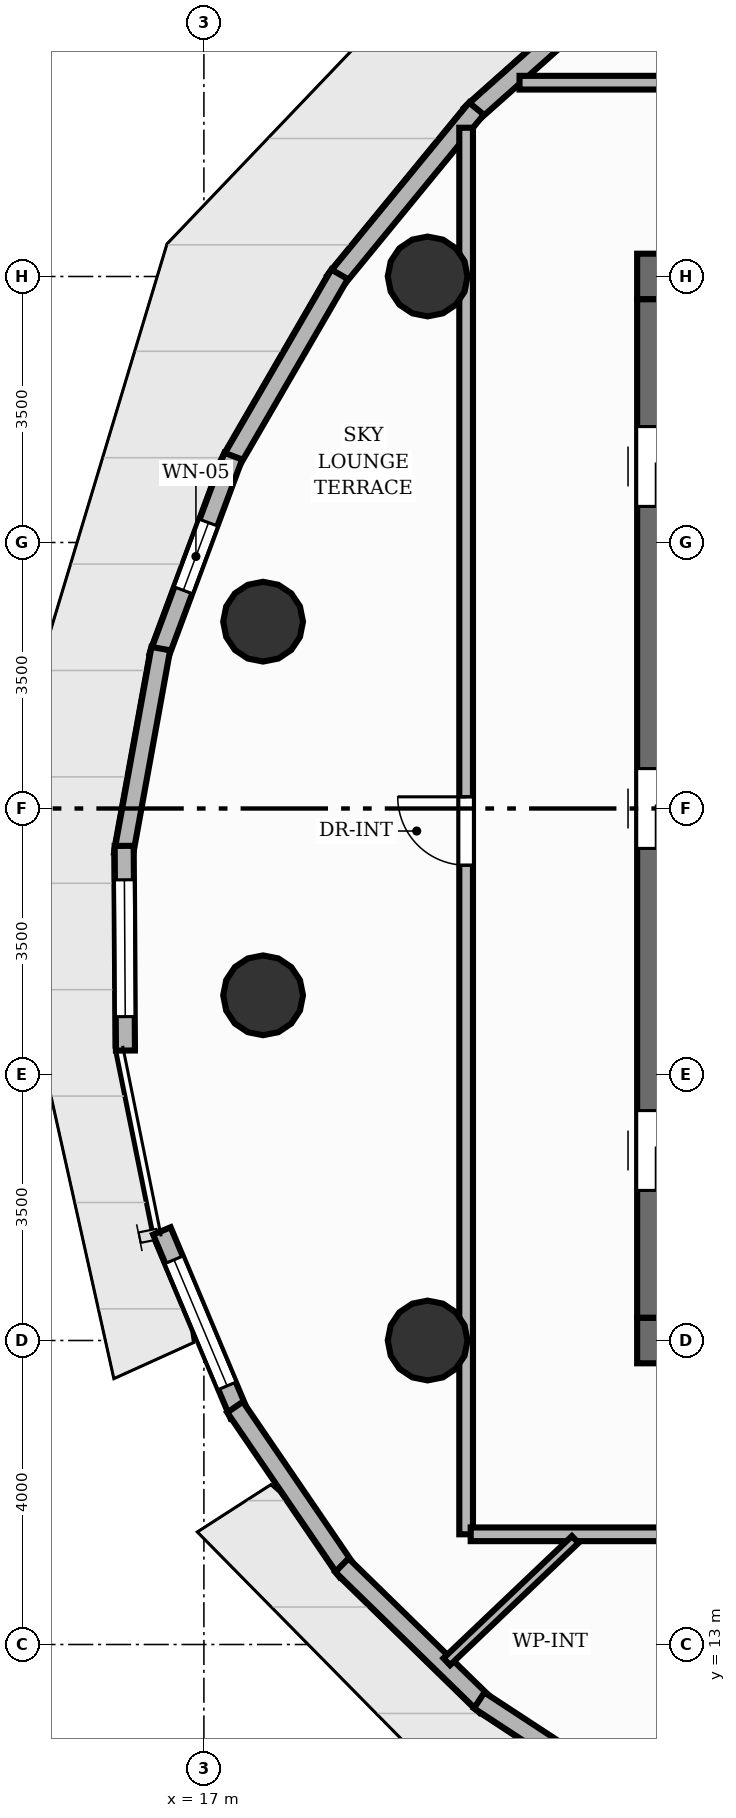
"""IFC4 building model, lengths in metres.
Left out: names, types, materials, properties, quantities, classifications, styles, units other than length and angle.
Written with IfcOpenShell. Run it as: python <this file> out.ifc"""

import sys

from ifc_helpers import new_model, si_unit, direction, frame, frame_2d, origin, origin_2d, place, context, subcontext, project, spatial, rectangle, circle, extrude, element, fill, save


model = new_model("IFC4")
c1 = context("Model", 3, precision=1e-05, world=origin(), true_north=direction((0.0, 1.0)))
c2 = subcontext(c1, "Body", "Model", "MODEL_VIEW")
j1 = project(units=[si_unit("LENGTHUNIT", "METRE"), si_unit("PLANEANGLEUNIT", "RADIAN")], contexts=[c1])
p1 = place(None, origin())
s1 = spatial("IfcSite", under=j1, at=p1, CompositionType="ELEMENT")
p2 = place(p1, origin())
s2 = spatial("IfcBuilding", under=s1, at=p2, CompositionType="ELEMENT")
p3 = place(p2, frame((0.0, 0.0, 116.96)))
s3 = spatial("IfcBuildingStorey", under=s2, at=p3, CompositionType="ELEMENT", Elevation=116.96)
p4 = place(p3, frame((22.7, 17.0, 0.0), z_axis=(0.0, 0.0, 1.0), x_axis=(1.0, 0.0, 0.0)))
e1 = element("IfcWall", 1, at=p4, inside=s3, PredefinedType="SHEAR", context=c2, shape_type="SweptSolid", body=[
    extrude(rectangle(XDim=18.6, YDim=0.6, at=frame_2d((9.3, 0.0))), origin(), (0.0, 0.0, 1.0), 3.2),
])
p5 = place(p4, frame((5.8, 0.0, 0.0)))
e2 = element("IfcOpeningElement", 2, at=p5, cuts=e1, PredefinedType="OPENING", context=c2, shape_type="SweptSolid", body=[
    extrude(rectangle(XDim=1.1, YDim=2.15, at=frame_2d((0.55, 1.075))), frame((0.0, 0.31, 0.0), z_axis=(0.0, -1.0, 0.0), x_axis=(1.0, 0.0, 0.0)), (0.0, 0.0, 1.0), 0.62),
])
p6 = place(p4, frame((9.35, 0.0, 0.0)))
e3 = element("IfcOpeningElement", 3, at=p6, cuts=e1, PredefinedType="OPENING", context=c2, shape_type="SweptSolid", body=[
    extrude(rectangle(XDim=0.9, YDim=2.1, at=frame_2d((0.45, 1.05))), frame((0.0, 0.31, 0.0), z_axis=(0.0, -1.0, 0.0), x_axis=(1.0, 0.0, 0.0)), (0.0, 0.0, 1.0), 0.62),
])
p7 = place(p3, frame((22.7, 31.0, 0.0), z_axis=(0.0, 0.0, 1.0), x_axis=(1.0, 0.0, 0.0)))
e4 = element("IfcWall", 4, at=p7, inside=s3, PredefinedType="SHEAR", context=c2, shape_type="SweptSolid", body=[
    extrude(rectangle(XDim=18.6, YDim=0.6, at=frame_2d((9.3, 0.0))), origin(), (0.0, 0.0, 1.0), 3.2),
])
p8 = place(p7, frame((11.7, 0.0, 0.0)))
e5 = element("IfcOpeningElement", 5, at=p8, cuts=e4, PredefinedType="OPENING", context=c2, shape_type="SweptSolid", body=[
    extrude(rectangle(XDim=1.1, YDim=2.15, at=frame_2d((0.55, 1.075))), frame((0.0, 0.31, 0.0), z_axis=(0.0, -1.0, 0.0), x_axis=(1.0, 0.0, 0.0)), (0.0, 0.0, 1.0), 0.62),
])
p9 = place(p7, frame((4.325, 0.0, 0.0)))
e6 = element("IfcOpeningElement", 6, at=p9, cuts=e4, PredefinedType="OPENING", context=c2, shape_type="SweptSolid", body=[
    extrude(rectangle(XDim=1.05, YDim=2.15, at=frame_2d((0.525, 1.075))), frame((0.0, 0.31, 0.0), z_axis=(0.0, -1.0, 0.0), x_axis=(1.0, 0.0, 0.0)), (0.0, 0.0, 1.0), 0.62),
])
p10 = place(p7, frame((6.075, 0.0, 0.0)))
e7 = element("IfcOpeningElement", 7, at=p10, cuts=e4, PredefinedType="OPENING", context=c2, shape_type="SweptSolid", body=[
    extrude(rectangle(XDim=1.05, YDim=2.15, at=frame_2d((0.525, 1.075))), frame((0.0, 0.31, 0.0), z_axis=(0.0, -1.0, 0.0), x_axis=(1.0, 0.0, 0.0)), (0.0, 0.0, 1.0), 0.62),
])
p11 = place(p7, frame((7.825, 0.0, 0.0)))
e8 = element("IfcOpeningElement", 8, at=p11, cuts=e4, PredefinedType="OPENING", context=c2, shape_type="SweptSolid", body=[
    extrude(rectangle(XDim=1.05, YDim=2.15, at=frame_2d((0.525, 1.075))), frame((0.0, 0.31, 0.0), z_axis=(0.0, -1.0, 0.0), x_axis=(1.0, 0.0, 0.0)), (0.0, 0.0, 1.0), 0.62),
])
p12 = place(p3, frame((23.0, 17.3, 0.0), z_axis=(0.0, 0.0, 1.0), x_axis=(0.0, 1.0, 0.0)))
e9 = element("IfcWall", 9, at=p12, inside=s3, PredefinedType="SHEAR", context=c2, shape_type="SweptSolid", body=[
    extrude(rectangle(XDim=13.4, YDim=0.6, at=frame_2d((6.7, 0.0))), origin(), (0.0, 0.0, 1.0), 3.2),
])
p13 = place(p12, frame((1.675, 0.0, 0.0)))
e10 = element("IfcOpeningElement", 10, at=p13, cuts=e9, PredefinedType="OPENING", context=c2, shape_type="SweptSolid", body=[
    extrude(rectangle(XDim=1.05, YDim=2.15, at=frame_2d((0.525, 1.075))), frame((0.0, 0.31, 0.0), z_axis=(0.0, -1.0, 0.0), x_axis=(1.0, 0.0, 0.0)), (0.0, 0.0, 1.0), 0.62),
])
p14 = place(p12, frame((6.175, 0.0, 0.0)))
e11 = element("IfcOpeningElement", 11, at=p14, cuts=e9, PredefinedType="OPENING", context=c2, shape_type="SweptSolid", body=[
    extrude(rectangle(XDim=1.05, YDim=2.15, at=frame_2d((0.525, 1.075))), frame((0.0, 0.31, 0.0), z_axis=(0.0, -1.0, 0.0), x_axis=(1.0, 0.0, 0.0)), (0.0, 0.0, 1.0), 0.62),
])
p15 = place(p12, frame((10.675, 0.0, 0.0)))
e12 = element("IfcOpeningElement", 12, at=p15, cuts=e9, PredefinedType="OPENING", context=c2, shape_type="SweptSolid", body=[
    extrude(rectangle(XDim=1.05, YDim=2.15, at=frame_2d((0.525, 1.075))), frame((0.0, 0.31, 0.0), z_axis=(0.0, -1.0, 0.0), x_axis=(1.0, 0.0, 0.0)), (0.0, 0.0, 1.0), 0.62),
])
for number, where, z_axis, x_axis in (
    (13, (19.944, 31.0, 0.0), (0.0, 0.0, 1.0), (1.0, 0.0, 0.0)),
    (14, (17.779, 26.458, 0.0), (0.0, 0.0, 1.0), (1.0, 0.0, 0.0)),
    (15, (17.779, 21.542, 0.0), (0.0, 0.0, 1.0), (1.0, 0.0, 0.0)),
    (16, (19.944, 17.0, 0.0), (0.0, 0.0, 1.0), (1.0, 0.0, 0.0)),
):
    element("IfcColumn", number, at=place(p3, frame(where, z_axis=z_axis, x_axis=x_axis)), inside=s3, PredefinedType="COLUMN", context=c2, shape_type="SweptSolid", body=[
        extrude(circle(Radius=0.525, at=origin_2d()), origin(), (0.0, 0.0, 1.0), 3.2),
    ])
p16 = place(p3, frame((20.51, 33.13, 0.0), z_axis=(0.0, 0.0, 1.0), x_axis=(0.746920467444, 0.664913389332, 0.0)))
e17 = element("IfcWall", 17, at=p16, inside=s3, PredefinedType="SOLIDWALL", context=c2, shape_type="SweptSolid", body=[
    extrude(rectangle(XDim=2.977, YDim=0.25, at=frame_2d((1.489, 0.0))), origin(), (0.0, 0.0, 1.0), 2.96),
])
p17 = place(p3, frame((18.722, 30.938, 0.0), z_axis=(0.0, 0.0, 1.0), x_axis=(0.634328076021, 0.7730639637, 0.0)))
e18 = element("IfcWall", 18, at=p17, inside=s3, PredefinedType="SOLIDWALL", context=c2, shape_type="SweptSolid", body=[
    extrude(rectangle(XDim=2.937, YDim=0.25, at=frame_2d((1.469, 0.0))), origin(), (0.0, 0.0, 1.0), 2.96),
])
p18 = place(p3, frame((17.34, 28.536, 0.0), z_axis=(0.0, 0.0, 1.0), x_axis=(0.501630602612, 0.865081925903, 0.0)))
e19 = element("IfcWall", 19, at=p18, inside=s3, PredefinedType="SOLIDWALL", context=c2, shape_type="SweptSolid", body=[
    extrude(rectangle(XDim=2.882, YDim=0.25, at=frame_2d((1.441, 0.0))), origin(), (0.0, 0.0, 1.0), 2.96),
])
p19 = place(p3, frame((16.403, 25.996, 0.0), z_axis=(0.0, 0.0, 1.0), x_axis=(0.349100071797, 0.93708544961, 0.0)))
e20 = element("IfcWall", 20, at=p19, inside=s3, PredefinedType="SOLIDWALL", context=c2, shape_type="SweptSolid", body=[
    extrude(rectangle(XDim=2.818, YDim=0.25, at=frame_2d((1.409, 0.0))), origin(), (0.0, 0.0, 1.0), 2.96),
])
p20 = place(p19, frame((0.934, 0.0, 0.85)))
e21 = element("IfcOpeningElement", 21, at=p20, cuts=e20, PredefinedType="OPENING", context=c2, shape_type="SweptSolid", body=[
    extrude(rectangle(XDim=0.95, YDim=1.45, at=frame_2d((0.475, 0.725))), frame((0.0, 0.135, 0.0), z_axis=(0.0, -1.0, 0.0), x_axis=(1.0, 0.0, 0.0)), (0.0, 0.0, 1.0), 0.27),
])
p21 = place(p3, frame((15.941, 23.396, 0.0), z_axis=(0.0, 0.0, 1.0), x_axis=(0.178495077034, 0.983940804863, 0.0)))
e22 = element("IfcWall", 22, at=p21, inside=s3, PredefinedType="SOLIDWALL", context=c2, shape_type="SweptSolid", body=[
    extrude(rectangle(XDim=2.752, YDim=0.25, at=frame_2d((1.376, 0.0))), origin(), (0.0, 0.0, 1.0), 2.96),
])
p22 = place(p3, frame((15.968, 20.815, 0.0), z_axis=(0.0, 0.0, 1.0), x_axis=(-0.006164887379, 0.999980996901, 0.0)))
e23 = element("IfcWall", 23, at=p22, inside=s3, PredefinedType="SOLIDWALL", context=c2, shape_type="SweptSolid", body=[
    extrude(rectangle(XDim=2.693, YDim=0.25, at=frame_2d((1.346, 0.0))), origin(), (0.0, 0.0, 1.0), 2.96),
])
p23 = place(p22, frame((0.446, 0.0, 0.85)))
e24 = element("IfcOpeningElement", 24, at=p23, cuts=e23, PredefinedType="OPENING", context=c2, shape_type="SweptSolid", body=[
    extrude(rectangle(XDim=1.8, YDim=1.45, at=frame_2d((0.9, 0.725))), frame((0.0, 0.135, 0.0), z_axis=(0.0, -1.0, 0.0), x_axis=(1.0, 0.0, 0.0)), (0.0, 0.0, 1.0), 0.27),
])
p24 = place(p3, frame((17.465, 16.023, 0.0), z_axis=(0.0, 0.0, 1.0), x_axis=(-0.387790779971, 0.921747422546, 0.0)))
e25 = element("IfcWall", 25, at=p24, inside=s3, PredefinedType="SOLIDWALL", context=c2, shape_type="SweptSolid", body=[
    extrude(rectangle(XDim=2.624, YDim=0.25, at=frame_2d((1.312, 0.0))), origin(), (0.0, 0.0, 1.0), 2.96),
])
p25 = place(p24, frame((0.412, 0.0, 0.85)))
e26 = element("IfcOpeningElement", 26, at=p25, cuts=e25, PredefinedType="OPENING", context=c2, shape_type="SweptSolid", body=[
    extrude(rectangle(XDim=1.8, YDim=2.0, at=frame_2d((0.9, 1.0))), frame((0.0, 0.135, 0.0), z_axis=(0.0, -1.0, 0.0), x_axis=(1.0, 0.0, 0.0)), (0.0, 0.0, 1.0), 0.27),
])
p26 = place(p3, frame((18.889, 13.956, 0.0), z_axis=(0.0, 0.0, 1.0), x_axis=(-0.563599495618, 0.826048187783, 0.0)))
e27 = element("IfcWall", 27, at=p26, inside=s3, PredefinedType="SOLIDWALL", context=c2, shape_type="SweptSolid", body=[
    extrude(rectangle(XDim=2.624, YDim=0.25, at=frame_2d((1.312, 0.0))), origin(), (0.0, 0.0, 1.0), 2.96),
])
p27 = place(p3, frame((20.71, 12.194, 0.0), z_axis=(0.0, 0.0, 1.0), x_axis=(-0.715536902875, 0.698574935582, 0.0)))
e28 = element("IfcWall", 28, at=p27, inside=s3, PredefinedType="SOLIDWALL", context=c2, shape_type="SweptSolid", body=[
    extrude(rectangle(XDim=2.648, YDim=0.25, at=frame_2d((1.324, 0.0))), origin(), (0.0, 0.0, 1.0), 2.96),
])
p28 = place(p3, frame((22.874, 10.789, 0.0), z_axis=(0.0, 0.0, 1.0), x_axis=(-0.836445365251, 0.5480503179, 0.0)))
e29 = element("IfcWall", 29, at=p28, inside=s3, PredefinedType="SOLIDWALL", context=c2, shape_type="SweptSolid", body=[
    extrude(rectangle(XDim=2.693, YDim=0.25, at=frame_2d((1.346, 0.0))), origin(), (0.0, 0.0, 1.0), 2.96),
])
p29 = place(p3, frame((21.153, 33.55, 0.0), z_axis=(0.0, 0.0, 1.0), x_axis=(1.0, 0.0, 0.0)))
e30 = element("IfcWall", 30, at=p29, inside=s3, PredefinedType="PARTITIONING", context=c2, shape_type="SweptSolid", body=[
    extrude(rectangle(XDim=22.397, YDim=0.18, at=frame_2d((11.199, 0.0))), origin(), (0.0, 0.0, 1.0), 2.955),
])
p30 = place(p29, frame((8.512, 0.0, 0.0)))
e31 = element("IfcOpeningElement", 31, at=p30, cuts=e30, PredefinedType="OPENING", context=c2, shape_type="SweptSolid", body=[
    extrude(rectangle(XDim=0.9, YDim=2.1, at=frame_2d((0.45, 1.05))), frame((0.0, 0.1, 0.0), z_axis=(0.0, -1.0, 0.0), x_axis=(1.0, 0.0, 0.0)), (0.0, 0.0, 1.0), 0.2),
])
p31 = place(p3, frame((20.45, 14.45, 0.0), z_axis=(0.0, 0.0, 1.0), x_axis=(0.0, 1.0, 0.0)))
e32 = element("IfcWall", 32, at=p31, inside=s3, PredefinedType="PARTITIONING", context=c2, shape_type="SweptSolid", body=[
    extrude(rectangle(XDim=18.507, YDim=0.18, at=frame_2d((9.254, 0.0))), origin(), (0.0, 0.0, 1.0), 2.955),
])
p32 = place(p31, frame((8.804, 0.0, 0.0)))
e33 = element("IfcOpeningElement", 33, at=p32, cuts=e32, PredefinedType="OPENING", context=c2, shape_type="SweptSolid", body=[
    extrude(rectangle(XDim=0.9, YDim=2.1, at=frame_2d((0.45, 1.05))), frame((0.0, 0.1, 0.0), z_axis=(0.0, -1.0, 0.0), x_axis=(1.0, 0.0, 0.0)), (0.0, 0.0, 1.0), 0.2),
])
p33 = place(p3, frame((36.186, 14.45, 0.0), z_axis=(0.0, 0.0, 1.0), x_axis=(-1.0, 0.0, 0.0)))
e34 = element("IfcWall", 34, at=p33, inside=s3, PredefinedType="PARTITIONING", context=c2, shape_type="SweptSolid", body=[
    extrude(rectangle(XDim=15.676, YDim=0.18, at=frame_2d((7.838, 0.0))), origin(), (0.0, 0.0, 1.0), 2.955),
])
p34 = place(p33, frame((6.679, 0.0, 0.0)))
e35 = element("IfcOpeningElement", 35, at=p34, cuts=e34, PredefinedType="OPENING", context=c2, shape_type="SweptSolid", body=[
    extrude(rectangle(XDim=0.9, YDim=2.1, at=frame_2d((0.45, 1.05))), frame((0.0, 0.1, 0.0), z_axis=(0.0, -1.0, 0.0), x_axis=(1.0, 0.0, 0.0)), (0.0, 0.0, 1.0), 0.2),
])
p35 = place(p3, frame((21.885, 14.381, 0.0), z_axis=(0.0, 0.0, 1.0), x_axis=(-0.724677896259, -0.68908776413, 0.0)))
e36 = element("IfcWall", 36, at=p35, inside=s3, PredefinedType="PARTITIONING", context=c2, shape_type="SweptSolid", body=[
    extrude(rectangle(XDim=2.332, YDim=0.125, at=frame_2d((1.166, 0.0))), origin(), (0.0, 0.0, 1.0), 2.955),
])
p36 = place(p20, origin())
e37 = element("IfcWindow", 37, at=p36, inside=s3, PartitioningType="SINGLE_PANEL", PredefinedType="WINDOW", context=c2, shape_type="SweptSolid", body=[
    extrude(rectangle(XDim=0.95, YDim=1.45, at=frame_2d((0.475, 0.725))), frame((0.0, 0.03, 0.0), z_axis=(0.0, -1.0, 0.0), x_axis=(1.0, 0.0, 0.0)), (0.0, 0.0, 1.0), 0.06),
])
fill(e21, e37)
p37 = place(p23, origin())
e38 = element("IfcWindow", 38, at=p37, inside=s3, PartitioningType="SINGLE_PANEL", PredefinedType="WINDOW", context=c2, shape_type="SweptSolid", body=[
    extrude(rectangle(XDim=1.8, YDim=1.45, at=frame_2d((0.9, 0.725))), frame((0.0, 0.03, 0.0), z_axis=(0.0, -1.0, 0.0), x_axis=(1.0, 0.0, 0.0)), (0.0, 0.0, 1.0), 0.06),
])
fill(e24, e38)
p38 = place(p25, origin())
e39 = element("IfcWindow", 39, at=p38, inside=s3, PartitioningType="SINGLE_PANEL", PredefinedType="WINDOW", context=c2, shape_type="SweptSolid", body=[
    extrude(rectangle(XDim=1.8, YDim=2.0, at=frame_2d((0.9, 1.0))), frame((0.0, 0.03, 0.0), z_axis=(0.0, -1.0, 0.0), x_axis=(1.0, 0.0, 0.0)), (0.0, 0.0, 1.0), 0.06),
])
fill(e26, e39)
p39 = place(p32, origin())
e40 = element("IfcDoor", 40, at=p39, inside=s3, OperationType="SINGLE_SWING_RIGHT", PredefinedType="DOOR", context=c2, shape_type="SweptSolid", body=[
    extrude(rectangle(XDim=0.9, YDim=2.1, at=frame_2d((0.45, 1.05))), frame((0.0, 0.025, 0.0), z_axis=(0.0, -1.0, 0.0), x_axis=(1.0, 0.0, 0.0)), (0.0, 0.0, 1.0), 0.05),
])
fill(e33, e40)
save(model, sys.argv[1])
